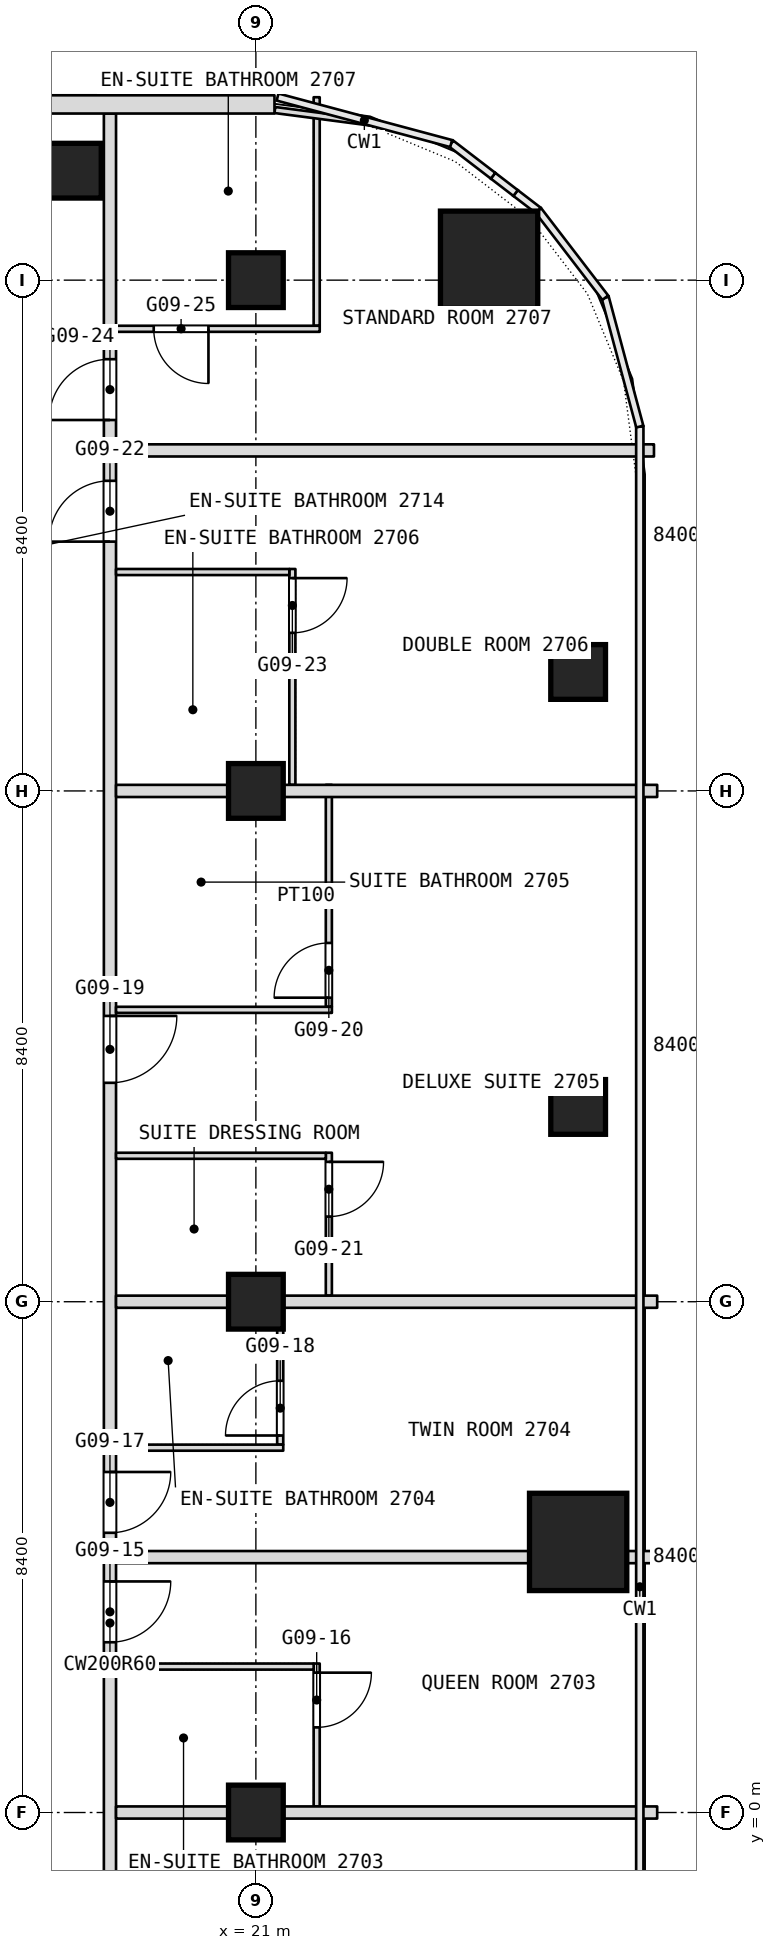
"""IFC4 building model, lengths in metres.
Left out: names, types, materials, properties, quantities, classifications, styles, units other than length and angle.
Written with IfcOpenShell. Run it as: python <this file> out.ifc"""

import sys

from ifc_helpers import new_model, si_unit, direction, frame, frame_2d, origin, origin_2d, place, context, subcontext, project, spatial, rectangle, extrude, element, fill, save


model = new_model("IFC4")
c1 = context("Model", 3, precision=1e-05, world=origin(), true_north=direction((0.0, 1.0)))
c2 = subcontext(c1, "Body", "Model", "MODEL_VIEW")
j1 = project(units=[si_unit("LENGTHUNIT", "METRE"), si_unit("PLANEANGLEUNIT", "RADIAN")], contexts=[c1])
p1 = place(None, origin())
s1 = spatial("IfcSite", under=j1, at=p1, CompositionType="ELEMENT")
p2 = place(p1, origin())
s2 = spatial("IfcBuilding", under=s1, at=p2, CompositionType="ELEMENT")
p3 = place(p2, frame((0.0, 0.0, 122.9)))
s3 = spatial("IfcBuildingStorey", under=s2, at=p3, CompositionType="ELEMENT", Elevation=122.9)
for number, where, z_axis, x_axis in (
    (1, (26.3, 4.45, 0.0), (0.0, 0.0, 1.0), (1.0, 0.0, 0.0)),
    (2, (24.835, 25.535, 0.0), (0.0, 0.0, 1.0), (1.0, 0.0, 0.0)),
):
    element("IfcColumn", number, at=place(p3, frame(where, z_axis=z_axis, x_axis=x_axis)), inside=s3, PredefinedType="COLUMN", context=c2, shape_type="SweptSolid", body=[
        extrude(rectangle(XDim=1.6, YDim=1.6, at=origin_2d()), origin(), (0.0, 0.0, 1.0), 3.6),
    ])
for number, where, z_axis, x_axis in (
    (3, (21.0, 0.0, 0.0), (0.0, 0.0, 1.0), (1.0, 0.0, 0.0)),
    (4, (21.0, 8.4, 0.0), (0.0, 0.0, 1.0), (1.0, 0.0, 0.0)),
    (5, (21.0, 16.8, 0.0), (0.0, 0.0, 1.0), (1.0, 0.0, 0.0)),
    (6, (21.0, 25.2, 0.0), (0.0, 0.0, 1.0), (1.0, 0.0, 0.0)),
    (7, (18.007, 27.0, 0.0), (0.0, 0.0, 1.0), (1.0, 0.0, 0.0)),
    (8, (26.3, 18.756, 0.0), (0.0, 0.0, 1.0), (1.0, 0.0, 0.0)),
    (9, (26.3, 11.603, 0.0), (0.0, 0.0, 1.0), (1.0, 0.0, 0.0)),
):
    element("IfcColumn", number, at=place(p3, frame(where, z_axis=z_axis, x_axis=x_axis)), inside=s3, PredefinedType="COLUMN", context=c2, shape_type="SweptSolid", body=[
        extrude(rectangle(XDim=0.9, YDim=0.9, at=origin_2d()), origin(), (0.0, 0.0, 1.0), 3.6),
    ])
p4 = place(p3, frame((22.2, 8.5, 0.0), z_axis=(0.0, 0.0, 1.0), x_axis=(0.0, 1.0, 0.0)))
e10 = element("IfcWall", 10, at=p4, inside=s3, PredefinedType="PARTITIONING", context=c2, shape_type="SweptSolid", body=[
    extrude(rectangle(XDim=2.35, YDim=0.1, at=frame_2d((1.175, 0.0))), origin(), (0.0, 0.0, 1.0), 3.34),
])
p5 = place(p4, frame((1.3, 0.0, 0.0)))
e11 = element("IfcOpeningElement", 11, at=p5, cuts=e10, PredefinedType="OPENING", context=c2, shape_type="SweptSolid", body=[
    extrude(rectangle(XDim=0.9, YDim=2.1, at=frame_2d((0.45, 1.05))), frame((0.0, 0.05, 0.0), z_axis=(0.0, -1.0, 0.0), x_axis=(1.0, 0.0, 0.0)), (0.0, 0.0, 1.0), 0.1),
])
p6 = place(p3, frame((22.2, 13.25, 0.0), z_axis=(0.0, 0.0, 1.0), x_axis=(0.0, 1.0, 0.0)))
e12 = element("IfcWall", 12, at=p6, inside=s3, PredefinedType="PARTITIONING", context=c2, shape_type="SweptSolid", body=[
    extrude(rectangle(XDim=3.65, YDim=0.1, at=frame_2d((1.825, 0.0))), origin(), (0.0, 0.0, 1.0), 3.34),
])
p7 = place(p6, frame((0.15, 0.0, 0.0)))
e13 = element("IfcOpeningElement", 13, at=p7, cuts=e12, PredefinedType="OPENING", context=c2, shape_type="SweptSolid", body=[
    extrude(rectangle(XDim=0.9, YDim=2.1, at=frame_2d((0.45, 1.05))), frame((0.0, 0.05, 0.0), z_axis=(0.0, -1.0, 0.0), x_axis=(1.0, 0.0, 0.0)), (0.0, 0.0, 1.0), 0.1),
])
p8 = place(p3, frame((22.0, 0.1, 0.0), z_axis=(0.0, 0.0, 1.0), x_axis=(0.0, 1.0, 0.0)))
e14 = element("IfcWall", 14, at=p8, inside=s3, PredefinedType="PARTITIONING", context=c2, shape_type="SweptSolid", body=[
    extrude(rectangle(XDim=2.35, YDim=0.1, at=frame_2d((1.175, 0.0))), origin(), (0.0, 0.0, 1.0), 3.34),
])
p9 = place(p8, frame((1.3, 0.0, 0.0)))
e15 = element("IfcOpeningElement", 15, at=p9, cuts=e14, PredefinedType="OPENING", context=c2, shape_type="SweptSolid", body=[
    extrude(rectangle(XDim=0.9, YDim=2.1, at=frame_2d((0.45, 1.05))), frame((0.0, 0.05, 0.0), z_axis=(0.0, -1.0, 0.0), x_axis=(1.0, 0.0, 0.0)), (0.0, 0.0, 1.0), 0.1),
])
p10 = place(p3, frame((22.0, 24.45, 0.0), z_axis=(0.0, 0.0, 1.0), x_axis=(0.0, 1.0, 0.0)))
e16 = element("IfcWall", 16, at=p10, inside=s3, PredefinedType="PARTITIONING", context=c2, shape_type="SweptSolid", body=[
    extrude(rectangle(XDim=3.758, YDim=0.1, at=frame_2d((1.879, 0.0))), origin(), (0.0, 0.0, 1.0), 3.34),
])
p11 = place(p3, frame((21.6, 16.9, 0.0), z_axis=(0.0, 0.0, 1.0), x_axis=(0.0, 1.0, 0.0)))
e17 = element("IfcWall", 17, at=p11, inside=s3, PredefinedType="PARTITIONING", context=c2, shape_type="SweptSolid", body=[
    extrude(rectangle(XDim=3.55, YDim=0.1, at=frame_2d((1.775, 0.0))), origin(), (0.0, 0.0, 1.0), 3.34),
])
p12 = place(p11, frame((2.5, 0.0, 0.0)))
e18 = element("IfcOpeningElement", 18, at=p12, cuts=e17, PredefinedType="OPENING", context=c2, shape_type="SweptSolid", body=[
    extrude(rectangle(XDim=0.9, YDim=2.1, at=frame_2d((0.45, 1.05))), frame((0.0, 0.05, 0.0), z_axis=(0.0, -1.0, 0.0), x_axis=(1.0, 0.0, 0.0)), (0.0, 0.0, 1.0), 0.1),
])
p13 = place(p3, frame((21.4, 6.05, 0.0), z_axis=(0.0, 0.0, 1.0), x_axis=(0.0, 1.0, 0.0)))
e19 = element("IfcWall", 19, at=p13, inside=s3, PredefinedType="PARTITIONING", context=c2, shape_type="SweptSolid", body=[
    extrude(rectangle(XDim=2.45, YDim=0.1, at=frame_2d((1.225, 0.0))), origin(), (0.0, 0.0, 1.0), 3.34),
])
p14 = place(p13, frame((0.15, 0.0, 0.0)))
e20 = element("IfcOpeningElement", 20, at=p14, cuts=e19, PredefinedType="OPENING", context=c2, shape_type="SweptSolid", body=[
    extrude(rectangle(XDim=0.9, YDim=2.1, at=frame_2d((0.45, 1.05))), frame((0.0, 0.05, 0.0), z_axis=(0.0, -1.0, 0.0), x_axis=(1.0, 0.0, 0.0)), (0.0, 0.0, 1.0), 0.1),
])
p15 = place(p3, frame((18.6, -21.708, 0.0), z_axis=(0.0, 0.0, 1.0), x_axis=(0.0, 1.0, 0.0)))
e21 = element("IfcWall", 21, at=p15, inside=s3, PredefinedType="PARTITIONING", context=c2, shape_type="SweptSolid", body=[
    extrude(rectangle(XDim=49.648, YDim=0.2, at=frame_2d((24.824, 0.0))), origin(), (0.0, 0.0, 1.0), 3.34),
])
p16 = place(p15, frame((2.8, 0.0, 0.0)))
e22 = element("IfcOpeningElement", 22, at=p16, cuts=e21, PredefinedType="OPENING", context=c2, shape_type="SweptSolid", body=[
    extrude(rectangle(XDim=1.0, YDim=2.1, at=frame_2d((0.5, 1.05))), frame((0.0, 0.1, 0.0), z_axis=(0.0, -1.0, 0.0), x_axis=(1.0, 0.0, 0.0)), (0.0, 0.0, 1.0), 0.2),
])
p17 = place(p15, frame((10.658, 0.0, 0.0)))
e23 = element("IfcOpeningElement", 23, at=p17, cuts=e21, PredefinedType="OPENING", context=c2, shape_type="SweptSolid", body=[
    extrude(rectangle(XDim=1.1, YDim=2.1, at=frame_2d((0.55, 1.05))), frame((0.0, 0.1, 0.0), z_axis=(0.0, -1.0, 0.0), x_axis=(1.0, 0.0, 0.0)), (0.0, 0.0, 1.0), 0.2),
])
p18 = place(p15, frame((16.608, 0.0, 0.0)))
e24 = element("IfcOpeningElement", 24, at=p18, cuts=e21, PredefinedType="OPENING", context=c2, shape_type="SweptSolid", body=[
    extrude(rectangle(XDim=1.8, YDim=2.1, at=frame_2d((0.9, 1.05))), frame((0.0, 0.1, 0.0), z_axis=(0.0, -1.0, 0.0), x_axis=(1.0, 0.0, 0.0)), (0.0, 0.0, 1.0), 0.2),
])
p19 = place(p15, frame((24.508, 0.0, 0.0)))
e25 = element("IfcOpeningElement", 25, at=p19, cuts=e21, PredefinedType="OPENING", context=c2, shape_type="SweptSolid", body=[
    extrude(rectangle(XDim=1.0, YDim=2.1, at=frame_2d((0.5, 1.05))), frame((0.0, 0.1, 0.0), z_axis=(0.0, -1.0, 0.0), x_axis=(1.0, 0.0, 0.0)), (0.0, 0.0, 1.0), 0.2),
])
p20 = place(p15, frame((26.308, 0.0, 0.0)))
e26 = element("IfcOpeningElement", 26, at=p20, cuts=e21, PredefinedType="OPENING", context=c2, shape_type="SweptSolid", body=[
    extrude(rectangle(XDim=1.0, YDim=2.1, at=frame_2d((0.5, 1.05))), frame((0.0, 0.1, 0.0), z_axis=(0.0, -1.0, 0.0), x_axis=(1.0, 0.0, 0.0)), (0.0, 0.0, 1.0), 0.2),
])
p21 = place(p15, frame((33.708, 0.0, 0.0)))
e27 = element("IfcOpeningElement", 27, at=p21, cuts=e21, PredefinedType="OPENING", context=c2, shape_type="SweptSolid", body=[
    extrude(rectangle(XDim=1.1, YDim=2.1, at=frame_2d((0.55, 1.05))), frame((0.0, 0.1, 0.0), z_axis=(0.0, -1.0, 0.0), x_axis=(1.0, 0.0, 0.0)), (0.0, 0.0, 1.0), 0.2),
])
p22 = place(p15, frame((42.608, 0.0, 0.0)))
e28 = element("IfcOpeningElement", 28, at=p22, cuts=e21, PredefinedType="OPENING", context=c2, shape_type="SweptSolid", body=[
    extrude(rectangle(XDim=1.0, YDim=2.1, at=frame_2d((0.5, 1.05))), frame((0.0, 0.1, 0.0), z_axis=(0.0, -1.0, 0.0), x_axis=(1.0, 0.0, 0.0)), (0.0, 0.0, 1.0), 0.2),
])
p23 = place(p15, frame((44.608, 0.0, 0.0)))
e29 = element("IfcOpeningElement", 29, at=p23, cuts=e21, PredefinedType="OPENING", context=c2, shape_type="SweptSolid", body=[
    extrude(rectangle(XDim=1.0, YDim=2.1, at=frame_2d((0.5, 1.05))), frame((0.0, 0.1, 0.0), z_axis=(0.0, -1.0, 0.0), x_axis=(1.0, 0.0, 0.0)), (0.0, 0.0, 1.0), 0.2),
])
p24 = place(p3, frame((18.7, 0.0, 0.0), z_axis=(0.0, 0.0, 1.0), x_axis=(1.0, 0.0, 0.0)))
e30 = element("IfcWall", 30, at=p24, inside=s3, PredefinedType="PARTITIONING", context=c2, shape_type="SweptSolid", body=[
    extrude(rectangle(XDim=8.9, YDim=0.2, at=frame_2d((4.45, 0.0))), origin(), (0.0, 0.0, 1.0), 2.89),
])
p25 = place(p3, frame((18.7, 2.4, 0.0), z_axis=(0.0, 0.0, 1.0), x_axis=(1.0, 0.0, 0.0)))
e31 = element("IfcWall", 31, at=p25, inside=s3, PredefinedType="PARTITIONING", context=c2, shape_type="SweptSolid", body=[
    extrude(rectangle(XDim=3.25, YDim=0.1, at=frame_2d((1.625, 0.0))), origin(), (0.0, 0.0, 1.0), 3.34),
])
p26 = place(p3, frame((18.7, 4.2, 0.0), z_axis=(0.0, 0.0, 1.0), x_axis=(1.0, 0.0, 0.0)))
e32 = element("IfcWall", 32, at=p26, inside=s3, PredefinedType="PARTITIONING", context=c2, shape_type="SweptSolid", body=[
    extrude(rectangle(XDim=6.8, YDim=0.2, at=frame_2d((3.4, 0.0))), origin(), (0.0, 0.0, 1.0), 3.34),
])
p27 = place(p3, frame((27.1, 4.2, 0.0), z_axis=(0.0, 0.0, 1.0), x_axis=(1.0, 0.0, 0.0)))
e33 = element("IfcWall", 33, at=p27, inside=s3, PredefinedType="PARTITIONING", context=c2, shape_type="SweptSolid", body=[
    extrude(rectangle(XDim=0.5, YDim=0.2, at=frame_2d((0.25, 0.0))), origin(), (0.0, 0.0, 1.0), 3.34),
])
p28 = place(p3, frame((18.7, 6.0, 0.0), z_axis=(0.0, 0.0, 1.0), x_axis=(1.0, 0.0, 0.0)))
e34 = element("IfcWall", 34, at=p28, inside=s3, PredefinedType="PARTITIONING", context=c2, shape_type="SweptSolid", body=[
    extrude(rectangle(XDim=2.75, YDim=0.1, at=frame_2d((1.375, 0.0))), origin(), (0.0, 0.0, 1.0), 3.34),
])
p29 = place(p3, frame((18.7, 8.4, 0.0), z_axis=(0.0, 0.0, 1.0), x_axis=(1.0, 0.0, 0.0)))
e35 = element("IfcWall", 35, at=p29, inside=s3, PredefinedType="PARTITIONING", context=c2, shape_type="SweptSolid", body=[
    extrude(rectangle(XDim=8.9, YDim=0.2, at=frame_2d((4.45, 0.0))), origin(), (0.0, 0.0, 1.0), 2.89),
])
p30 = place(p3, frame((18.7, 10.8, 0.0), z_axis=(0.0, 0.0, 1.0), x_axis=(1.0, 0.0, 0.0)))
e36 = element("IfcWall", 36, at=p30, inside=s3, PredefinedType="PARTITIONING", context=c2, shape_type="SweptSolid", body=[
    extrude(rectangle(XDim=3.45, YDim=0.1, at=frame_2d((1.725, 0.0))), origin(), (0.0, 0.0, 1.0), 3.34),
])
p31 = place(p3, frame((18.7, 13.2, 0.0), z_axis=(0.0, 0.0, 1.0), x_axis=(1.0, 0.0, 0.0)))
e37 = element("IfcWall", 37, at=p31, inside=s3, PredefinedType="PARTITIONING", context=c2, shape_type="SweptSolid", body=[
    extrude(rectangle(XDim=3.55, YDim=0.1, at=frame_2d((1.775, 0.0))), origin(), (0.0, 0.0, 1.0), 3.34),
])
p32 = place(p3, frame((18.7, 16.8, 0.0), z_axis=(0.0, 0.0, 1.0), x_axis=(1.0, 0.0, 0.0)))
e38 = element("IfcWall", 38, at=p32, inside=s3, PredefinedType="PARTITIONING", context=c2, shape_type="SweptSolid", body=[
    extrude(rectangle(XDim=8.9, YDim=0.2, at=frame_2d((4.45, 0.0))), origin(), (0.0, 0.0, 1.0), 2.89),
])
p33 = place(p3, frame((18.7, 20.4, 0.0), z_axis=(0.0, 0.0, 1.0), x_axis=(1.0, 0.0, 0.0)))
e39 = element("IfcWall", 39, at=p33, inside=s3, PredefinedType="PARTITIONING", context=c2, shape_type="SweptSolid", body=[
    extrude(rectangle(XDim=2.85, YDim=0.1, at=frame_2d((1.425, 0.0))), origin(), (0.0, 0.0, 1.0), 3.34),
])
p34 = place(p3, frame((18.7, 22.4, 0.0), z_axis=(0.0, 0.0, 1.0), x_axis=(1.0, 0.0, 0.0)))
e40 = element("IfcWall", 40, at=p34, inside=s3, PredefinedType="PARTITIONING", context=c2, shape_type="SweptSolid", body=[
    extrude(rectangle(XDim=8.847, YDim=0.2, at=frame_2d((4.424, 0.0))), origin(), (0.0, 0.0, 1.0), 3.34),
])
p35 = place(p3, frame((18.7, 24.4, 0.0), z_axis=(0.0, 0.0, 1.0), x_axis=(1.0, 0.0, 0.0)))
e41 = element("IfcWall", 41, at=p35, inside=s3, PredefinedType="PARTITIONING", context=c2, shape_type="SweptSolid", body=[
    extrude(rectangle(XDim=3.35, YDim=0.1, at=frame_2d((1.675, 0.0))), origin(), (0.0, 0.0, 1.0), 3.34),
])
p36 = place(p35, frame((0.62, 0.0, 0.0)))
e42 = element("IfcOpeningElement", 42, at=p36, cuts=e41, PredefinedType="OPENING", context=c2, shape_type="SweptSolid", body=[
    extrude(rectangle(XDim=0.9, YDim=2.1, at=frame_2d((0.45, 1.05))), frame((0.0, 0.05, 0.0), z_axis=(0.0, -1.0, 0.0), x_axis=(1.0, 0.0, 0.0)), (0.0, 0.0, 1.0), 0.1),
])
p37 = place(p3, frame((21.312, 27.998, 0.0), z_axis=(0.0, 0.0, 1.0), x_axis=(0.991547575144, -0.129743617284, 0.0)))
e43 = element("IfcWall", 43, at=p37, inside=s3, PredefinedType="PARTITIONING", context=c2, shape_type="SweptSolid", body=[
    extrude(rectangle(XDim=1.626, YDim=0.1, at=frame_2d((0.813, 0.0))), origin(), (0.0, 0.0, 1.0), 3.34),
])
p38 = place(p3, frame((21.306, 28.09, 0.0), z_axis=(0.0, 0.0, 1.0), x_axis=(-1.0, 0.0, 0.0)))
e44 = element("IfcWall", 44, at=p38, inside=s3, PredefinedType="NOTDEFINED", context=c2, shape_type="SweptSolid", body=[
    extrude(rectangle(XDim=42.612, YDim=0.3, at=frame_2d((21.306, 0.0))), origin(), (0.0, 0.0, 1.0), 3.6),
])
p39 = place(p38, frame((5.406, 0.0, 0.9)))
e45 = element("IfcOpeningElement", 45, at=p39, cuts=e44, PredefinedType="OPENING", context=c2, shape_type="SweptSolid", body=[
    extrude(rectangle(XDim=2.4, YDim=2.1, at=frame_2d((1.2, 1.05))), frame((0.0, 0.15, 0.0), z_axis=(0.0, -1.0, 0.0), x_axis=(1.0, 0.0, 0.0)), (0.0, 0.0, 1.0), 0.3),
])
p40 = place(p38, frame((9.606, 0.0, 0.9)))
e46 = element("IfcOpeningElement", 46, at=p40, cuts=e44, PredefinedType="OPENING", context=c2, shape_type="SweptSolid", body=[
    extrude(rectangle(XDim=2.4, YDim=2.1, at=frame_2d((1.2, 1.05))), frame((0.0, 0.15, 0.0), z_axis=(0.0, -1.0, 0.0), x_axis=(1.0, 0.0, 0.0)), (0.0, 0.0, 1.0), 0.3),
])
p41 = place(p38, frame((13.806, 0.0, 0.9)))
e47 = element("IfcOpeningElement", 47, at=p41, cuts=e44, PredefinedType="OPENING", context=c2, shape_type="SweptSolid", body=[
    extrude(rectangle(XDim=2.4, YDim=2.1, at=frame_2d((1.2, 1.05))), frame((0.0, 0.15, 0.0), z_axis=(0.0, -1.0, 0.0), x_axis=(1.0, 0.0, 0.0)), (0.0, 0.0, 1.0), 0.3),
])
p42 = place(p38, frame((18.006, 0.0, 0.9)))
e48 = element("IfcOpeningElement", 48, at=p42, cuts=e44, PredefinedType="OPENING", context=c2, shape_type="SweptSolid", body=[
    extrude(rectangle(XDim=2.4, YDim=2.1, at=frame_2d((1.2, 1.05))), frame((0.0, 0.15, 0.0), z_axis=(0.0, -1.0, 0.0), x_axis=(1.0, 0.0, 0.0)), (0.0, 0.0, 1.0), 0.3),
])
p43 = place(p38, frame((22.206, 0.0, 0.9)))
e49 = element("IfcOpeningElement", 49, at=p43, cuts=e44, PredefinedType="OPENING", context=c2, shape_type="SweptSolid", body=[
    extrude(rectangle(XDim=2.4, YDim=2.1, at=frame_2d((1.2, 1.05))), frame((0.0, 0.15, 0.0), z_axis=(0.0, -1.0, 0.0), x_axis=(1.0, 0.0, 0.0)), (0.0, 0.0, 1.0), 0.3),
])
p44 = place(p38, frame((26.406, 0.0, 0.9)))
e50 = element("IfcOpeningElement", 50, at=p44, cuts=e44, PredefinedType="OPENING", context=c2, shape_type="SweptSolid", body=[
    extrude(rectangle(XDim=2.4, YDim=2.1, at=frame_2d((1.2, 1.05))), frame((0.0, 0.15, 0.0), z_axis=(0.0, -1.0, 0.0), x_axis=(1.0, 0.0, 0.0)), (0.0, 0.0, 1.0), 0.3),
])
p45 = place(p38, frame((30.606, 0.0, 0.9)))
e51 = element("IfcOpeningElement", 51, at=p45, cuts=e44, PredefinedType="OPENING", context=c2, shape_type="SweptSolid", body=[
    extrude(rectangle(XDim=2.4, YDim=2.1, at=frame_2d((1.2, 1.05))), frame((0.0, 0.15, 0.0), z_axis=(0.0, -1.0, 0.0), x_axis=(1.0, 0.0, 0.0)), (0.0, 0.0, 1.0), 0.3),
])
p46 = place(p38, frame((34.806, 0.0, 0.9)))
e52 = element("IfcOpeningElement", 52, at=p46, cuts=e44, PredefinedType="OPENING", context=c2, shape_type="SweptSolid", body=[
    extrude(rectangle(XDim=2.4, YDim=2.1, at=frame_2d((1.2, 1.05))), frame((0.0, 0.15, 0.0), z_axis=(0.0, -1.0, 0.0), x_axis=(1.0, 0.0, 0.0)), (0.0, 0.0, 1.0), 0.3),
])
p47 = place(p5, origin())
e53 = element("IfcDoor", 53, at=p47, inside=s3, OperationType="SINGLE_SWING_RIGHT", PredefinedType="DOOR", context=c2, shape_type="SweptSolid", body=[
    extrude(rectangle(XDim=0.9, YDim=2.1, at=frame_2d((0.45, 1.05))), frame((0.0, 0.025, 0.0), z_axis=(0.0, -1.0, 0.0), x_axis=(1.0, 0.0, 0.0)), (0.0, 0.0, 1.0), 0.05),
])
fill(e11, e53)
p48 = place(p7, origin())
e54 = element("IfcDoor", 54, at=p48, inside=s3, OperationType="SINGLE_SWING_LEFT", PredefinedType="DOOR", context=c2, shape_type="SweptSolid", body=[
    extrude(rectangle(XDim=0.9, YDim=2.1, at=frame_2d((0.45, 1.05))), frame((0.0, 0.025, 0.0), z_axis=(0.0, -1.0, 0.0), x_axis=(1.0, 0.0, 0.0)), (0.0, 0.0, 1.0), 0.05),
])
fill(e13, e54)
p49 = place(p9, origin())
e55 = element("IfcDoor", 55, at=p49, inside=s3, OperationType="SINGLE_SWING_RIGHT", PredefinedType="DOOR", context=c2, shape_type="SweptSolid", body=[
    extrude(rectangle(XDim=0.9, YDim=2.1, at=frame_2d((0.45, 1.05))), frame((0.0, 0.025, 0.0), z_axis=(0.0, -1.0, 0.0), x_axis=(1.0, 0.0, 0.0)), (0.0, 0.0, 1.0), 0.05),
])
fill(e15, e55)
p50 = place(p12, origin())
e56 = element("IfcDoor", 56, at=p50, inside=s3, OperationType="SINGLE_SWING_RIGHT", PredefinedType="DOOR", context=c2, shape_type="SweptSolid", body=[
    extrude(rectangle(XDim=0.9, YDim=2.1, at=frame_2d((0.45, 1.05))), frame((0.0, 0.025, 0.0), z_axis=(0.0, -1.0, 0.0), x_axis=(1.0, 0.0, 0.0)), (0.0, 0.0, 1.0), 0.05),
])
fill(e18, e56)
p51 = place(p14, origin())
e57 = element("IfcDoor", 57, at=p51, inside=s3, OperationType="SINGLE_SWING_LEFT", PredefinedType="DOOR", context=c2, shape_type="SweptSolid", body=[
    extrude(rectangle(XDim=0.9, YDim=2.1, at=frame_2d((0.45, 1.05))), frame((0.0, 0.025, 0.0), z_axis=(0.0, -1.0, 0.0), x_axis=(1.0, 0.0, 0.0)), (0.0, 0.0, 1.0), 0.05),
])
fill(e20, e57)
p52 = place(p19, origin())
e58 = element("IfcDoor", 58, at=p52, inside=s3, OperationType="SINGLE_SWING_LEFT", PredefinedType="DOOR", context=c2, shape_type="SweptSolid", body=[
    extrude(rectangle(XDim=1.0, YDim=2.1, at=frame_2d((0.5, 1.05))), frame((0.0, 0.025, 0.0), z_axis=(0.0, -1.0, 0.0), x_axis=(1.0, 0.0, 0.0)), (0.0, 0.0, 1.0), 0.05),
])
fill(e25, e58)
p53 = place(p20, origin())
e59 = element("IfcDoor", 59, at=p53, inside=s3, OperationType="SINGLE_SWING_LEFT", PredefinedType="DOOR", context=c2, shape_type="SweptSolid", body=[
    extrude(rectangle(XDim=1.0, YDim=2.1, at=frame_2d((0.5, 1.05))), frame((0.0, 0.025, 0.0), z_axis=(0.0, -1.0, 0.0), x_axis=(1.0, 0.0, 0.0)), (0.0, 0.0, 1.0), 0.05),
])
fill(e26, e59)
p54 = place(p21, origin())
e60 = element("IfcDoor", 60, at=p54, inside=s3, OperationType="SINGLE_SWING_LEFT", PredefinedType="DOOR", context=c2, shape_type="SweptSolid", body=[
    extrude(rectangle(XDim=1.1, YDim=2.1, at=frame_2d((0.55, 1.05))), frame((0.0, 0.025, 0.0), z_axis=(0.0, -1.0, 0.0), x_axis=(1.0, 0.0, 0.0)), (0.0, 0.0, 1.0), 0.05),
])
fill(e27, e60)
p55 = place(p22, origin())
e61 = element("IfcDoor", 61, at=p55, inside=s3, OperationType="SINGLE_SWING_RIGHT", PredefinedType="DOOR", context=c2, shape_type="SweptSolid", body=[
    extrude(rectangle(XDim=1.0, YDim=2.1, at=frame_2d((0.5, 1.05))), frame((0.0, 0.025, 0.0), z_axis=(0.0, -1.0, 0.0), x_axis=(1.0, 0.0, 0.0)), (0.0, 0.0, 1.0), 0.05),
])
fill(e28, e61)
p56 = place(p23, origin())
e62 = element("IfcDoor", 62, at=p56, inside=s3, OperationType="SINGLE_SWING_RIGHT", PredefinedType="DOOR", context=c2, shape_type="SweptSolid", body=[
    extrude(rectangle(XDim=1.0, YDim=2.1, at=frame_2d((0.5, 1.05))), frame((0.0, 0.025, 0.0), z_axis=(0.0, -1.0, 0.0), x_axis=(1.0, 0.0, 0.0)), (0.0, 0.0, 1.0), 0.05),
])
fill(e29, e62)
p57 = place(p36, origin())
e63 = element("IfcDoor", 63, at=p57, inside=s3, OperationType="SINGLE_SWING_RIGHT", PredefinedType="DOOR", context=c2, shape_type="SweptSolid", body=[
    extrude(rectangle(XDim=0.9, YDim=2.1, at=frame_2d((0.45, 1.05))), frame((0.0, 0.025, 0.0), z_axis=(0.0, -1.0, 0.0), x_axis=(1.0, 0.0, 0.0)), (0.0, 0.0, 1.0), 0.05),
])
fill(e42, e63)
save(model, sys.argv[1])
